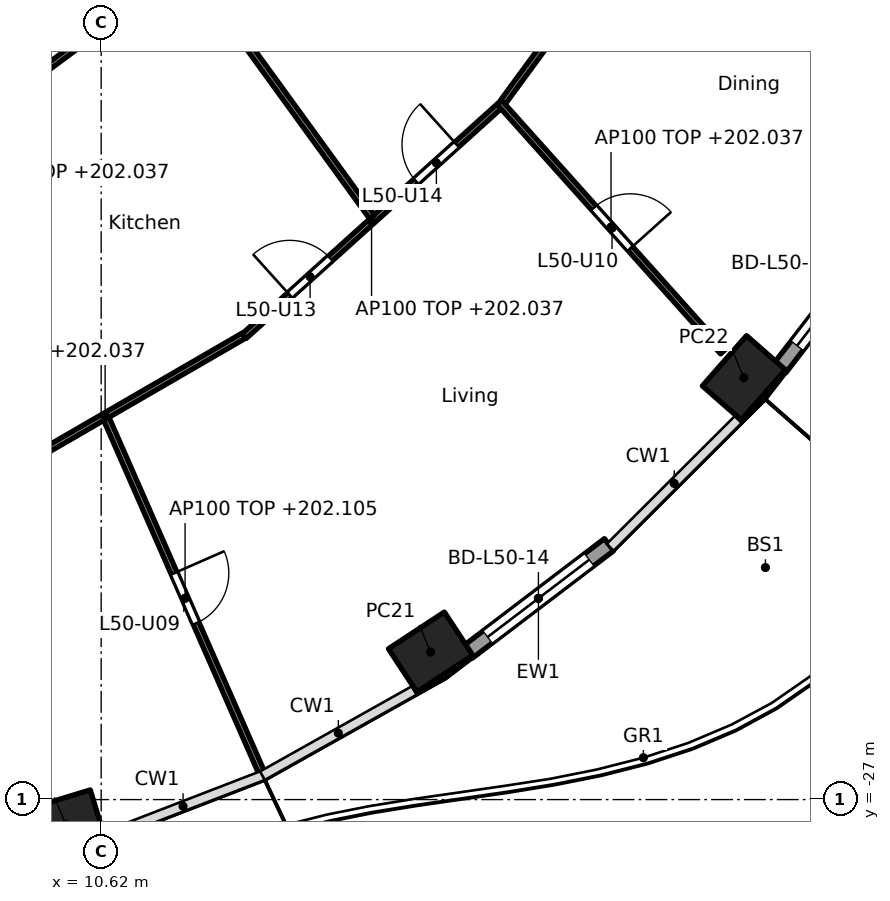
"""IFC4 building model, lengths in metres.
Left out: names, types, materials, properties, quantities, classifications, styles, units other than length and angle.
Written with IfcOpenShell. Run it as: python <this file> out.ifc"""

import sys

from ifc_helpers import new_model, si_unit, direction, frame, frame_2d, origin, origin_2d, place, context, subcontext, project, spatial, rectangle, hollow_rectangle, extrude, element, fill, save


model = new_model("IFC4")
c1 = context("Model", 3, precision=1e-05, world=origin(), true_north=direction((0.0, 1.0)))
c2 = subcontext(c1, "Body", "Model", "MODEL_VIEW")
j1 = project(units=[si_unit("LENGTHUNIT", "METRE"), si_unit("PLANEANGLEUNIT", "RADIAN")], contexts=[c1])
p1 = place(None, origin())
s1 = spatial("IfcSite", under=j1, at=p1, CompositionType="ELEMENT")
p2 = place(p1, origin())
s2 = spatial("IfcBuilding", under=s1, at=p2, CompositionType="ELEMENT")
p3 = place(p2, frame((0.0, 0.0, 199.2)))
s3 = spatial("IfcBuildingStorey", under=s2, at=p3, CompositionType="ELEMENT", Elevation=199.2)
for number, where, z_axis, x_axis in (
    (1, (10.038, -27.408, 0.0), (0.0, 0.0, 1.0), (0.957, 0.292, 0.0)),
    (2, (16.038, -24.573, 0.0), (0.0, 0.0, 1.0), (0.836, 0.549, 0.0)),
    (3, (21.189, -20.064, 0.0), (0.0, 0.0, 1.0), (0.66, 0.751, 0.0)),
):
    element("IfcColumn", number, at=place(p3, frame(where, z_axis=z_axis, x_axis=x_axis)), inside=s3, PredefinedType="COLUMN", context=c2, shape_type="SweptSolid", body=[
        extrude(hollow_rectangle(XDim=1.1, YDim=0.85, WallThickness=0.036, at=origin_2d()), origin(), (0.0, 0.0, 1.0), 3.7),
    ])
p4 = place(p3, frame((18.972, -22.809, 0.0), z_axis=(0.0, 0.0, 1.0), x_axis=(-0.796055733703, -0.60522332146, 0.0)))
e4 = element("IfcWall", 4, at=p4, inside=s3, PredefinedType="SOLIDWALL", context=c2, shape_type="SweptSolid", body=[
    extrude(rectangle(XDim=2.917, YDim=0.25, at=frame_2d((1.458, 0.0))), origin(), (0.0, 0.0, 1.0), 3.44),
])
p5 = place(p4, frame((0.408, 0.0, 0.0)))
e5 = element("IfcOpeningElement", 5, at=p5, cuts=e4, PredefinedType="OPENING", context=c2, shape_type="SweptSolid", body=[
    extrude(rectangle(XDim=2.1, YDim=2.4, at=frame_2d((1.05, 1.2))), frame((0.0, 0.135, 0.0), z_axis=(0.0, -1.0, 0.0), x_axis=(1.0, 0.0, 0.0)), (0.0, 0.0, 1.0), 0.27),
])
p6 = place(p3, frame((23.632, -17.502, 0.0), z_axis=(0.0, 0.0, 1.0), x_axis=(-0.610437428894, -0.79206448311, 0.0)))
e6 = element("IfcWall", 6, at=p6, inside=s3, PredefinedType="SOLIDWALL", context=c2, shape_type="SweptSolid", body=[
    extrude(rectangle(XDim=3.035, YDim=0.25, at=frame_2d((1.518, 0.0))), origin(), (0.0, 0.0, 1.0), 3.44),
])
p7 = place(p6, frame((0.468, 0.0, 0.0)))
e7 = element("IfcOpeningElement", 7, at=p7, cuts=e6, PredefinedType="OPENING", context=c2, shape_type="SweptSolid", body=[
    extrude(rectangle(XDim=2.1, YDim=2.4, at=frame_2d((1.05, 1.2))), frame((0.0, 0.135, 0.0), z_axis=(0.0, -1.0, 0.0), x_axis=(1.0, 0.0, 0.0)), (0.0, 0.0, 1.0), 0.27),
])
p8 = place(p3, frame((6.881, -17.08, 0.0), z_axis=(0.0, 0.0, 1.0), x_axis=(0.802784956441, 0.596268659005, 0.0)))
e8 = element("IfcWall", 8, at=p8, inside=s3, PredefinedType="PARTITIONING", context=c2, shape_type="SweptSolid", body=[
    extrude(rectangle(XDim=4.142, YDim=0.1, at=frame_2d((2.071, 0.0))), origin(), (0.0, 0.0, 1.0), 2.837),
])
p9 = place(p8, frame((2.384, 0.0, 0.0)))
e9 = element("IfcOpeningElement", 9, at=p9, cuts=e8, PredefinedType="OPENING", context=c2, shape_type="SweptSolid", body=[
    extrude(rectangle(XDim=0.9, YDim=2.1, at=frame_2d((0.45, 1.05))), frame((0.0, 0.06, 0.0), z_axis=(0.0, -1.0, 0.0), x_axis=(1.0, 0.0, 0.0)), (0.0, 0.0, 1.0), 0.12),
])
p10 = place(p3, frame((8.405, -22.013, 0.0), z_axis=(0.0, 0.0, 1.0), x_axis=(0.865277177388, 0.501293732547, 0.0)))
e10 = element("IfcWall", 10, at=p10, inside=s3, PredefinedType="PARTITIONING", context=c2, shape_type="SweptSolid", body=[
    extrude(rectangle(XDim=5.27, YDim=0.1, at=frame_2d((2.635, 0.0))), origin(), (0.0, 0.0, 1.0), 2.837),
])
p11 = place(p3, frame((10.705, -20.738, 0.0), z_axis=(0.0, 0.0, 1.0), x_axis=(0.401740633891, -0.915753494714, 0.0)))
e11 = element("IfcWall", 11, at=p11, inside=s3, PredefinedType="PARTITIONING", context=c2, shape_type="SweptSolid", body=[
    extrude(rectangle(XDim=6.445, YDim=0.1, at=frame_2d((3.223, 0.0))), origin(), (0.0, 0.0, 1.0), 2.905),
])
p12 = place(p11, frame((2.773, 0.0, 0.0)))
e12 = element("IfcOpeningElement", 12, at=p12, cuts=e11, PredefinedType="OPENING", context=c2, shape_type="SweptSolid", body=[
    extrude(rectangle(XDim=0.9, YDim=2.1, at=frame_2d((0.45, 1.05))), frame((0.0, 0.06, 0.0), z_axis=(0.0, -1.0, 0.0), x_axis=(1.0, 0.0, 0.0)), (0.0, 0.0, 1.0), 0.12),
])
p13 = place(p3, frame((12.971, -19.38, 0.0), z_axis=(0.0, 0.0, 1.0), x_axis=(0.742768881471, 0.669547898748, 0.0)))
e13 = element("IfcWall", 13, at=p13, inside=s3, PredefinedType="PARTITIONING", context=c2, shape_type="SweptSolid", body=[
    extrude(rectangle(XDim=5.642, YDim=0.1, at=frame_2d((2.821, 0.0))), origin(), (0.0, 0.0, 1.0), 2.837),
])
p14 = place(p13, frame((1.01, 0.0, 0.0)))
e14 = element("IfcOpeningElement", 14, at=p14, cuts=e13, PredefinedType="OPENING", context=c2, shape_type="SweptSolid", body=[
    extrude(rectangle(XDim=0.9, YDim=2.1, at=frame_2d((0.45, 1.05))), frame((0.0, 0.06, 0.0), z_axis=(0.0, -1.0, 0.0), x_axis=(1.0, 0.0, 0.0)), (0.0, 0.0, 1.0), 0.12),
])
p15 = place(p13, frame((3.806, 0.0, 0.0)))
e15 = element("IfcOpeningElement", 15, at=p15, cuts=e13, PredefinedType="OPENING", context=c2, shape_type="SweptSolid", body=[
    extrude(rectangle(XDim=0.9, YDim=2.1, at=frame_2d((0.45, 1.05))), frame((0.0, 0.06, 0.0), z_axis=(0.0, -1.0, 0.0), x_axis=(1.0, 0.0, 0.0)), (0.0, 0.0, 1.0), 0.12),
])
p16 = place(p3, frame((8.943, -8.966, 0.0), z_axis=(0.0, 0.0, 1.0), x_axis=(0.587181355751, -0.809455406714, 0.0)))
e16 = element("IfcWall", 16, at=p16, inside=s3, PredefinedType="PARTITIONING", context=c2, shape_type="SweptSolid", body=[
    extrude(rectangle(XDim=10.441, YDim=0.1, at=frame_2d((5.221, 0.0))), origin(), (0.0, 0.0, 1.0), 2.756),
])
p17 = place(p3, frame((17.166, -15.532, 0.0), z_axis=(0.0, 0.0, 1.0), x_axis=(0.66728415915, -0.744803229684, 0.0)))
e17 = element("IfcWall", 17, at=p17, inside=s3, PredefinedType="PARTITIONING", context=c2, shape_type="SweptSolid", body=[
    extrude(rectangle(XDim=5.511, YDim=0.1, at=frame_2d((2.756, 0.0))), origin(), (0.0, 0.0, 1.0), 2.837),
])
p18 = place(p17, frame((2.331, 0.0, 0.0)))
e18 = element("IfcOpeningElement", 18, at=p18, cuts=e17, PredefinedType="OPENING", context=c2, shape_type="SweptSolid", body=[
    extrude(rectangle(XDim=0.9, YDim=2.1, at=frame_2d((0.45, 1.05))), frame((0.0, 0.06, 0.0), z_axis=(0.0, -1.0, 0.0), x_axis=(1.0, 0.0, 0.0)), (0.0, 0.0, 1.0), 0.12),
])
p19 = place(p3, frame((17.229, -15.529, 0.0), z_axis=(0.0, 0.0, 1.0), x_axis=(0.591117075283, 0.806585769345, 0.0)))
e19 = element("IfcWall", 19, at=p19, inside=s3, PredefinedType="PARTITIONING", context=c2, shape_type="SweptSolid", body=[
    extrude(rectangle(XDim=6.01, YDim=0.1, at=frame_2d((3.005, 0.0))), origin(), (0.0, 0.0, 1.0), 2.837),
])
p20 = place(p5, origin())
e20 = element("IfcDoor", 20, at=p20, inside=s3, OperationType="SLIDING_TO_LEFT", PredefinedType="DOOR", context=c2, shape_type="SweptSolid", body=[
    extrude(rectangle(XDim=2.1, YDim=2.4, at=frame_2d((1.05, 1.2))), frame((0.0, 0.025, 0.0), z_axis=(0.0, -1.0, 0.0), x_axis=(1.0, 0.0, 0.0)), (0.0, 0.0, 1.0), 0.05),
])
fill(e5, e20)
p21 = place(p7, origin())
e21 = element("IfcDoor", 21, at=p21, inside=s3, OperationType="SLIDING_TO_LEFT", PredefinedType="DOOR", context=c2, shape_type="SweptSolid", body=[
    extrude(rectangle(XDim=2.1, YDim=2.4, at=frame_2d((1.05, 1.2))), frame((0.0, 0.025, 0.0), z_axis=(0.0, -1.0, 0.0), x_axis=(1.0, 0.0, 0.0)), (0.0, 0.0, 1.0), 0.05),
])
fill(e7, e21)
p22 = place(p12, origin())
e22 = element("IfcDoor", 22, at=p22, inside=s3, OperationType="SINGLE_SWING_LEFT", PredefinedType="DOOR", context=c2, shape_type="SweptSolid", body=[
    extrude(rectangle(XDim=0.9, YDim=2.1, at=frame_2d((0.45, 1.05))), frame((0.0, 0.025, 0.0), z_axis=(0.0, -1.0, 0.0), x_axis=(1.0, 0.0, 0.0)), (0.0, 0.0, 1.0), 0.05),
])
fill(e12, e22)
p23 = place(p18, origin())
e23 = element("IfcDoor", 23, at=p23, inside=s3, OperationType="SINGLE_SWING_RIGHT", PredefinedType="DOOR", context=c2, shape_type="SweptSolid", body=[
    extrude(rectangle(XDim=0.9, YDim=2.1, at=frame_2d((0.45, 1.05))), frame((0.0, 0.025, 0.0), z_axis=(0.0, -1.0, 0.0), x_axis=(1.0, 0.0, 0.0)), (0.0, 0.0, 1.0), 0.05),
])
fill(e18, e23)
p24 = place(p14, origin())
e24 = element("IfcDoor", 24, at=p24, inside=s3, OperationType="SINGLE_SWING_LEFT", PredefinedType="DOOR", context=c2, shape_type="SweptSolid", body=[
    extrude(rectangle(XDim=0.9, YDim=2.1, at=frame_2d((0.45, 1.05))), frame((0.0, 0.025, 0.0), z_axis=(0.0, -1.0, 0.0), x_axis=(1.0, 0.0, 0.0)), (0.0, 0.0, 1.0), 0.05),
])
fill(e14, e24)
p25 = place(p15, origin())
e25 = element("IfcDoor", 25, at=p25, inside=s3, OperationType="SINGLE_SWING_RIGHT", PredefinedType="DOOR", context=c2, shape_type="SweptSolid", body=[
    extrude(rectangle(XDim=0.9, YDim=2.1, at=frame_2d((0.45, 1.05))), frame((0.0, 0.025, 0.0), z_axis=(0.0, -1.0, 0.0), x_axis=(1.0, 0.0, 0.0)), (0.0, 0.0, 1.0), 0.05),
])
fill(e15, e25)
save(model, sys.argv[1])
